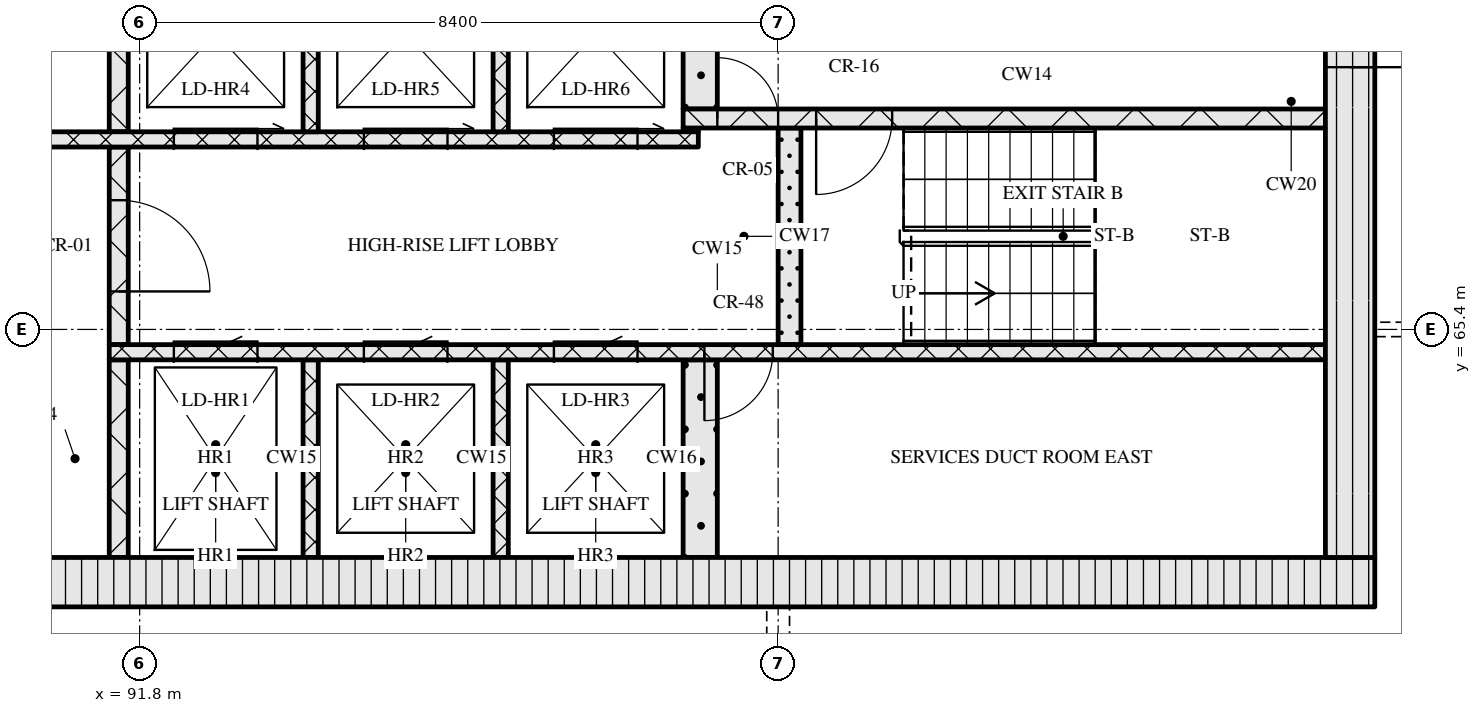
"""IFC4 building model, lengths in metres.
Left out: names, types, materials, properties, quantities, classifications, styles, units other than length and angle.
Written with IfcOpenShell. Run it as: python <this file> out.ifc"""

import sys

from ifc_helpers import new_model, si_unit, direction, frame, frame_2d, origin, place, context, subcontext, project, spatial, rectangle, extrude, element, fill, save


model = new_model("IFC4")
c1 = context("Model", 3, precision=1e-05, world=origin(), true_north=direction((0.0, 1.0)))
c2 = subcontext(c1, "Body", "Model", "MODEL_VIEW")
j1 = project(units=[si_unit("LENGTHUNIT", "METRE"), si_unit("PLANEANGLEUNIT", "RADIAN")], contexts=[c1])
p1 = place(None, origin())
s1 = spatial("IfcSite", under=j1, at=p1, CompositionType="ELEMENT")
p2 = place(p1, origin())
s2 = spatial("IfcBuilding", under=s1, at=p2, CompositionType="ELEMENT")
p3 = place(p2, frame((0.0, 0.0, 230.7)))
s3 = spatial("IfcBuildingStorey", under=s2, at=p3, CompositionType="ELEMENT", Elevation=230.7)
p4 = place(p3, frame((67.15, 62.075, 0.0), z_axis=(0.0, 0.0, 1.0), x_axis=(1.0, 0.0, 0.0)))
e1 = element("IfcWall", 1, at=p4, inside=s3, PredefinedType="SOLIDWALL", context=c2, shape_type="SweptSolid", body=[
    extrude(rectangle(XDim=40.9, YDim=0.65, at=frame_2d((20.45, 0.0))), origin(), (0.0, 0.0, 1.0), 3.32),
])
p5 = place(p4, frame((20.8, 0.0, 0.0)))
e2 = element("IfcOpeningElement", 2, at=p5, cuts=e1, PredefinedType="OPENING", context=c2, shape_type="SweptSolid", body=[
    extrude(rectangle(XDim=1.8, YDim=2.1, at=frame_2d((0.9, 1.05))), frame((0.0, 0.335, 0.0), z_axis=(0.0, -1.0, 0.0), x_axis=(1.0, 0.0, 0.0)), (0.0, 0.0, 1.0), 0.67),
])
p6 = place(p3, frame((107.725, 62.4, 0.0), z_axis=(0.0, 0.0, 1.0), x_axis=(0.0, 1.0, 0.0)))
e3 = element("IfcWall", 3, at=p6, inside=s3, PredefinedType="SOLIDWALL", context=c2, shape_type="SweptSolid", body=[
    extrude(rectangle(XDim=12.0, YDim=0.65, at=frame_2d((6.0, 0.0))), origin(), (0.0, 0.0, 1.0), 3.32),
])
p7 = place(p6, frame((6.45, 0.0, 0.0)))
e4 = element("IfcOpeningElement", 4, at=p7, cuts=e3, PredefinedType="OPENING", context=c2, shape_type="SweptSolid", body=[
    extrude(rectangle(XDim=1.2, YDim=2.1, at=frame_2d((0.6, 1.05))), frame((0.0, 0.335, 0.0), z_axis=(0.0, -1.0, 0.0), x_axis=(1.0, 0.0, 0.0)), (0.0, 0.0, 1.0), 0.67),
])
p8 = place(p3, frame((91.525, 62.4, 0.0), z_axis=(0.0, 0.0, 1.0), x_axis=(0.0, 1.0, 0.0)))
e5 = element("IfcWall", 5, at=p8, inside=s3, PredefinedType="SOLIDWALL", context=c2, shape_type="SweptSolid", body=[
    extrude(rectangle(XDim=2.6, YDim=0.25, at=frame_2d((1.3, 0.0))), origin(), (0.0, 0.0, 1.0), 3.32),
])
for number, where, z_axis, x_axis in (
    (6, (94.05, 62.4, 0.0), (0.0, 0.0, 1.0), (0.0, 1.0, 0.0)),
    (7, (96.55, 62.4, 0.0), (0.0, 0.0, 1.0), (0.0, 1.0, 0.0)),
):
    element("IfcWall", number, at=place(p3, frame(where, z_axis=z_axis, x_axis=x_axis)), inside=s3, PredefinedType="SOLIDWALL", context=c2, shape_type="SweptSolid", body=[
        extrude(rectangle(XDim=2.6, YDim=0.2, at=frame_2d((1.3, 0.0))), origin(), (0.0, 0.0, 1.0), 3.32),
    ])
p9 = place(p3, frame((99.175, 62.4, 0.0), z_axis=(0.0, 0.0, 1.0), x_axis=(0.0, 1.0, 0.0)))
e8 = element("IfcWall", 8, at=p9, inside=s3, PredefinedType="SOLIDWALL", context=c2, shape_type="SweptSolid", body=[
    extrude(rectangle(XDim=2.6, YDim=0.45, at=frame_2d((1.3, 0.0))), origin(), (0.0, 0.0, 1.0), 3.32),
])
p10 = place(p3, frame((91.4, 65.1, 0.0), z_axis=(0.0, 0.0, 1.0), x_axis=(1.0, 0.0, 0.0)))
e9 = element("IfcWall", 9, at=p10, inside=s3, PredefinedType="SOLIDWALL", context=c2, shape_type="SweptSolid", body=[
    extrude(rectangle(XDim=16.0, YDim=0.2, at=frame_2d((8.0, 0.0))), origin(), (0.0, 0.0, 1.0), 3.32),
])
p11 = place(p10, frame((0.85, 0.0, 0.0)))
e10 = element("IfcOpeningElement", 10, at=p11, cuts=e9, PredefinedType="OPENING", context=c2, shape_type="SweptSolid", body=[
    extrude(rectangle(XDim=1.1, YDim=2.1, at=frame_2d((0.55, 1.05))), frame((0.0, 0.11, 0.0), z_axis=(0.0, -1.0, 0.0), x_axis=(1.0, 0.0, 0.0)), (0.0, 0.0, 1.0), 0.22),
])
p12 = place(p10, frame((3.35, 0.0, 0.0)))
e11 = element("IfcOpeningElement", 11, at=p12, cuts=e9, PredefinedType="OPENING", context=c2, shape_type="SweptSolid", body=[
    extrude(rectangle(XDim=1.1, YDim=2.1, at=frame_2d((0.55, 1.05))), frame((0.0, 0.11, 0.0), z_axis=(0.0, -1.0, 0.0), x_axis=(1.0, 0.0, 0.0)), (0.0, 0.0, 1.0), 0.22),
])
p13 = place(p10, frame((5.85, 0.0, 0.0)))
e12 = element("IfcOpeningElement", 12, at=p13, cuts=e9, PredefinedType="OPENING", context=c2, shape_type="SweptSolid", body=[
    extrude(rectangle(XDim=1.1, YDim=2.1, at=frame_2d((0.55, 1.05))), frame((0.0, 0.11, 0.0), z_axis=(0.0, -1.0, 0.0), x_axis=(1.0, 0.0, 0.0)), (0.0, 0.0, 1.0), 0.22),
])
p14 = place(p10, frame((7.83, 0.0, 0.0)))
e13 = element("IfcOpeningElement", 13, at=p14, cuts=e9, PredefinedType="OPENING", context=c2, shape_type="SweptSolid", body=[
    extrude(rectangle(XDim=0.9, YDim=2.1, at=frame_2d((0.45, 1.05))), frame((0.0, 0.11, 0.0), z_axis=(0.0, -1.0, 0.0), x_axis=(1.0, 0.0, 0.0)), (0.0, 0.0, 1.0), 0.22),
])
p15 = place(p3, frame((91.525, 65.2, 0.0), z_axis=(0.0, 0.0, 1.0), x_axis=(0.0, 1.0, 0.0)))
e14 = element("IfcWall", 14, at=p15, inside=s3, PredefinedType="SOLIDWALL", context=c2, shape_type="SweptSolid", body=[
    extrude(rectangle(XDim=2.6, YDim=0.25, at=frame_2d((1.3, 0.0))), origin(), (0.0, 0.0, 1.0), 3.32),
])
p16 = place(p15, frame((0.7, 0.0, 0.0)))
e15 = element("IfcOpeningElement", 15, at=p16, cuts=e14, PredefinedType="OPENING", context=c2, shape_type="SweptSolid", body=[
    extrude(rectangle(XDim=1.2, YDim=2.1, at=frame_2d((0.6, 1.05))), frame((0.0, 0.135, 0.0), z_axis=(0.0, -1.0, 0.0), x_axis=(1.0, 0.0, 0.0)), (0.0, 0.0, 1.0), 0.27),
])
p17 = place(p3, frame((100.35, 65.2, 0.0), z_axis=(0.0, 0.0, 1.0), x_axis=(0.0, 1.0, 0.0)))
e16 = element("IfcWall", 16, at=p17, inside=s3, PredefinedType="SOLIDWALL", context=c2, shape_type="SweptSolid", body=[
    extrude(rectangle(XDim=2.85, YDim=0.3, at=frame_2d((1.425, 0.0))), origin(), (0.0, 0.0, 1.0), 3.32),
])
p18 = place(p3, frame((76.05, 67.9, 0.0), z_axis=(0.0, 0.0, 1.0), x_axis=(1.0, 0.0, 0.0)))
e17 = element("IfcWall", 17, at=p18, inside=s3, PredefinedType="SOLIDWALL", context=c2, shape_type="SweptSolid", body=[
    extrude(rectangle(XDim=23.1, YDim=0.2, at=frame_2d((11.55, 0.0))), origin(), (0.0, 0.0, 1.0), 3.32),
])
p19 = place(p18, frame((1.35, 0.0, 0.0)))
e18 = element("IfcOpeningElement", 18, at=p19, cuts=e17, PredefinedType="OPENING", context=c2, shape_type="SweptSolid", body=[
    extrude(rectangle(XDim=0.9, YDim=2.1, at=frame_2d((0.45, 1.05))), frame((0.0, 0.11, 0.0), z_axis=(0.0, -1.0, 0.0), x_axis=(1.0, 0.0, 0.0)), (0.0, 0.0, 1.0), 0.22),
])
p20 = place(p18, frame((5.06, 0.0, 0.0)))
e19 = element("IfcOpeningElement", 19, at=p20, cuts=e17, PredefinedType="OPENING", context=c2, shape_type="SweptSolid", body=[
    extrude(rectangle(XDim=0.9, YDim=2.1, at=frame_2d((0.45, 1.05))), frame((0.0, 0.11, 0.0), z_axis=(0.0, -1.0, 0.0), x_axis=(1.0, 0.0, 0.0)), (0.0, 0.0, 1.0), 0.22),
])
p21 = place(p18, frame((8.45, 0.0, 0.0)))
e20 = element("IfcOpeningElement", 20, at=p21, cuts=e17, PredefinedType="OPENING", context=c2, shape_type="SweptSolid", body=[
    extrude(rectangle(XDim=0.9, YDim=2.1, at=frame_2d((0.45, 1.05))), frame((0.0, 0.11, 0.0), z_axis=(0.0, -1.0, 0.0), x_axis=(1.0, 0.0, 0.0)), (0.0, 0.0, 1.0), 0.22),
])
p22 = place(p18, frame((10.91, 0.0, 0.0)))
e21 = element("IfcOpeningElement", 21, at=p22, cuts=e17, PredefinedType="OPENING", context=c2, shape_type="SweptSolid", body=[
    extrude(rectangle(XDim=0.9, YDim=2.1, at=frame_2d((0.45, 1.05))), frame((0.0, 0.11, 0.0), z_axis=(0.0, -1.0, 0.0), x_axis=(1.0, 0.0, 0.0)), (0.0, 0.0, 1.0), 0.22),
])
p23 = place(p18, frame((13.55, 0.0, 0.0)))
e22 = element("IfcOpeningElement", 22, at=p23, cuts=e17, PredefinedType="OPENING", context=c2, shape_type="SweptSolid", body=[
    extrude(rectangle(XDim=1.0, YDim=2.1, at=frame_2d((0.5, 1.05))), frame((0.0, 0.11, 0.0), z_axis=(0.0, -1.0, 0.0), x_axis=(1.0, 0.0, 0.0)), (0.0, 0.0, 1.0), 0.22),
])
p24 = place(p18, frame((16.2, 0.0, 0.0)))
e23 = element("IfcOpeningElement", 23, at=p24, cuts=e17, PredefinedType="OPENING", context=c2, shape_type="SweptSolid", body=[
    extrude(rectangle(XDim=1.1, YDim=2.1, at=frame_2d((0.55, 1.05))), frame((0.0, 0.11, 0.0), z_axis=(0.0, -1.0, 0.0), x_axis=(1.0, 0.0, 0.0)), (0.0, 0.0, 1.0), 0.22),
])
p25 = place(p18, frame((18.7, 0.0, 0.0)))
e24 = element("IfcOpeningElement", 24, at=p25, cuts=e17, PredefinedType="OPENING", context=c2, shape_type="SweptSolid", body=[
    extrude(rectangle(XDim=1.1, YDim=2.1, at=frame_2d((0.55, 1.05))), frame((0.0, 0.11, 0.0), z_axis=(0.0, -1.0, 0.0), x_axis=(1.0, 0.0, 0.0)), (0.0, 0.0, 1.0), 0.22),
])
p26 = place(p18, frame((21.2, 0.0, 0.0)))
e25 = element("IfcOpeningElement", 25, at=p26, cuts=e17, PredefinedType="OPENING", context=c2, shape_type="SweptSolid", body=[
    extrude(rectangle(XDim=1.1, YDim=2.1, at=frame_2d((0.55, 1.05))), frame((0.0, 0.11, 0.0), z_axis=(0.0, -1.0, 0.0), x_axis=(1.0, 0.0, 0.0)), (0.0, 0.0, 1.0), 0.22),
])
p27 = place(p3, frame((91.525, 68.0, 0.0), z_axis=(0.0, 0.0, 1.0), x_axis=(0.0, 1.0, 0.0)))
e26 = element("IfcWall", 26, at=p27, inside=s3, PredefinedType="SOLIDWALL", context=c2, shape_type="SweptSolid", body=[
    extrude(rectangle(XDim=2.6, YDim=0.25, at=frame_2d((1.3, 0.0))), origin(), (0.0, 0.0, 1.0), 3.32),
])
for number, where, z_axis, x_axis in (
    (27, (94.05, 68.0, 0.0), (0.0, 0.0, 1.0), (0.0, 1.0, 0.0)),
    (28, (96.55, 68.0, 0.0), (0.0, 0.0, 1.0), (0.0, 1.0, 0.0)),
):
    element("IfcWall", number, at=place(p3, frame(where, z_axis=z_axis, x_axis=x_axis)), inside=s3, PredefinedType="SOLIDWALL", context=c2, shape_type="SweptSolid", body=[
        extrude(rectangle(XDim=2.6, YDim=0.2, at=frame_2d((1.3, 0.0))), origin(), (0.0, 0.0, 1.0), 3.32),
    ])
p28 = place(p3, frame((98.95, 68.025, 0.0), z_axis=(0.0, 0.0, 1.0), x_axis=(1.0, 0.0, 0.0)))
e29 = element("IfcWall", 29, at=p28, inside=s3, PredefinedType="SOLIDWALL", context=c2, shape_type="SweptSolid", body=[
    extrude(rectangle(XDim=0.2, YDim=0.05, at=frame_2d((0.1, 0.0))), origin(), (0.0, 0.0, 1.0), 3.32),
])
p29 = place(p3, frame((98.95, 68.175, 0.0), z_axis=(0.0, 0.0, 1.0), x_axis=(1.0, 0.0, 0.0)))
e30 = element("IfcWall", 30, at=p29, inside=s3, PredefinedType="SOLIDWALL", context=c2, shape_type="SweptSolid", body=[
    extrude(rectangle(XDim=8.45, YDim=0.25, at=frame_2d((4.225, 0.0))), origin(), (0.0, 0.0, 1.0), 3.32),
])
p30 = place(p29, frame((0.45, 0.0, 0.0)))
e31 = element("IfcOpeningElement", 31, at=p30, cuts=e30, PredefinedType="OPENING", context=c2, shape_type="SweptSolid", body=[
    extrude(rectangle(XDim=0.8, YDim=2.1, at=frame_2d((0.4, 1.05))), frame((0.0, 0.135, 0.0), z_axis=(0.0, -1.0, 0.0), x_axis=(1.0, 0.0, 0.0)), (0.0, 0.0, 1.0), 0.27),
])
p31 = place(p29, frame((1.75, 0.0, 0.0)))
e32 = element("IfcOpeningElement", 32, at=p31, cuts=e30, PredefinedType="OPENING", context=c2, shape_type="SweptSolid", body=[
    extrude(rectangle(XDim=1.0, YDim=2.1, at=frame_2d((0.5, 1.05))), frame((0.0, 0.135, 0.0), z_axis=(0.0, -1.0, 0.0), x_axis=(1.0, 0.0, 0.0)), (0.0, 0.0, 1.0), 0.27),
])
p32 = place(p3, frame((99.175, 68.3, 0.0), z_axis=(0.0, 0.0, 1.0), x_axis=(0.0, 1.0, 0.0)))
e33 = element("IfcWall", 33, at=p32, inside=s3, PredefinedType="SOLIDWALL", context=c2, shape_type="SweptSolid", body=[
    extrude(rectangle(XDim=2.3, YDim=0.45, at=frame_2d((1.15, 0.0))), origin(), (0.0, 0.0, 1.0), 3.32),
])
p33 = place(p11, origin())
e34 = element("IfcDoor", 34, at=p33, inside=s3, OperationType="SLIDING_TO_LEFT", PredefinedType="DOOR", context=c2, shape_type="SweptSolid", body=[
    extrude(rectangle(XDim=1.1, YDim=2.1, at=frame_2d((0.55, 1.05))), frame((0.0, 0.025, 0.0), z_axis=(0.0, -1.0, 0.0), x_axis=(1.0, 0.0, 0.0)), (0.0, 0.0, 1.0), 0.05),
])
fill(e10, e34)
p34 = place(p12, origin())
e35 = element("IfcDoor", 35, at=p34, inside=s3, OperationType="SLIDING_TO_LEFT", PredefinedType="DOOR", context=c2, shape_type="SweptSolid", body=[
    extrude(rectangle(XDim=1.1, YDim=2.1, at=frame_2d((0.55, 1.05))), frame((0.0, 0.025, 0.0), z_axis=(0.0, -1.0, 0.0), x_axis=(1.0, 0.0, 0.0)), (0.0, 0.0, 1.0), 0.05),
])
fill(e11, e35)
p35 = place(p13, origin())
e36 = element("IfcDoor", 36, at=p35, inside=s3, OperationType="SLIDING_TO_LEFT", PredefinedType="DOOR", context=c2, shape_type="SweptSolid", body=[
    extrude(rectangle(XDim=1.1, YDim=2.1, at=frame_2d((0.55, 1.05))), frame((0.0, 0.025, 0.0), z_axis=(0.0, -1.0, 0.0), x_axis=(1.0, 0.0, 0.0)), (0.0, 0.0, 1.0), 0.05),
])
fill(e12, e36)
p36 = place(p14, origin())
e37 = element("IfcDoor", 37, at=p36, inside=s3, OperationType="SINGLE_SWING_RIGHT", PredefinedType="DOOR", context=c2, shape_type="SweptSolid", body=[
    extrude(rectangle(XDim=0.9, YDim=2.1, at=frame_2d((0.45, 1.05))), frame((0.0, 0.025, 0.0), z_axis=(0.0, -1.0, 0.0), x_axis=(1.0, 0.0, 0.0)), (0.0, 0.0, 1.0), 0.05),
])
fill(e13, e37)
p37 = place(p16, origin())
e38 = element("IfcDoor", 38, at=p37, inside=s3, OperationType="SINGLE_SWING_RIGHT", PredefinedType="DOOR", context=c2, shape_type="SweptSolid", body=[
    extrude(rectangle(XDim=1.2, YDim=2.1, at=frame_2d((0.6, 1.05))), frame((0.0, 0.025, 0.0), z_axis=(0.0, -1.0, 0.0), x_axis=(1.0, 0.0, 0.0)), (0.0, 0.0, 1.0), 0.05),
])
fill(e15, e38)
p38 = place(p24, origin())
e39 = element("IfcDoor", 39, at=p38, inside=s3, OperationType="SLIDING_TO_RIGHT", PredefinedType="DOOR", context=c2, shape_type="SweptSolid", body=[
    extrude(rectangle(XDim=1.1, YDim=2.1, at=frame_2d((0.55, 1.05))), frame((0.0, 0.025, 0.0), z_axis=(0.0, -1.0, 0.0), x_axis=(1.0, 0.0, 0.0)), (0.0, 0.0, 1.0), 0.05),
])
fill(e23, e39)
p39 = place(p25, origin())
e40 = element("IfcDoor", 40, at=p39, inside=s3, OperationType="SLIDING_TO_RIGHT", PredefinedType="DOOR", context=c2, shape_type="SweptSolid", body=[
    extrude(rectangle(XDim=1.1, YDim=2.1, at=frame_2d((0.55, 1.05))), frame((0.0, 0.025, 0.0), z_axis=(0.0, -1.0, 0.0), x_axis=(1.0, 0.0, 0.0)), (0.0, 0.0, 1.0), 0.05),
])
fill(e24, e40)
p40 = place(p26, origin())
e41 = element("IfcDoor", 41, at=p40, inside=s3, OperationType="SLIDING_TO_RIGHT", PredefinedType="DOOR", context=c2, shape_type="SweptSolid", body=[
    extrude(rectangle(XDim=1.1, YDim=2.1, at=frame_2d((0.55, 1.05))), frame((0.0, 0.025, 0.0), z_axis=(0.0, -1.0, 0.0), x_axis=(1.0, 0.0, 0.0)), (0.0, 0.0, 1.0), 0.05),
])
fill(e25, e41)
p41 = place(p30, origin())
e42 = element("IfcDoor", 42, at=p41, inside=s3, OperationType="SINGLE_SWING_LEFT", PredefinedType="DOOR", context=c2, shape_type="SweptSolid", body=[
    extrude(rectangle(XDim=0.8, YDim=2.1, at=frame_2d((0.4, 1.05))), frame((0.0, 0.025, 0.0), z_axis=(0.0, -1.0, 0.0), x_axis=(1.0, 0.0, 0.0)), (0.0, 0.0, 1.0), 0.05),
])
fill(e31, e42)
p42 = place(p31, origin())
e43 = element("IfcDoor", 43, at=p42, inside=s3, OperationType="SINGLE_SWING_RIGHT", PredefinedType="DOOR", context=c2, shape_type="SweptSolid", body=[
    extrude(rectangle(XDim=1.0, YDim=2.1, at=frame_2d((0.5, 1.05))), frame((0.0, 0.025, 0.0), z_axis=(0.0, -1.0, 0.0), x_axis=(1.0, 0.0, 0.0)), (0.0, 0.0, 1.0), 0.05),
])
fill(e32, e43)
p43 = place(p7, origin())
e44 = element("IfcDoor", 44, at=p43, inside=s3, OperationType="SINGLE_SWING_RIGHT", PredefinedType="DOOR", context=c2, shape_type="SweptSolid", body=[
    extrude(rectangle(XDim=1.2, YDim=2.1, at=frame_2d((0.6, 1.05))), frame((0.0, 0.025, 0.0), z_axis=(0.0, -1.0, 0.0), x_axis=(1.0, 0.0, 0.0)), (0.0, 0.0, 1.0), 0.05),
])
fill(e4, e44)
save(model, sys.argv[1])
